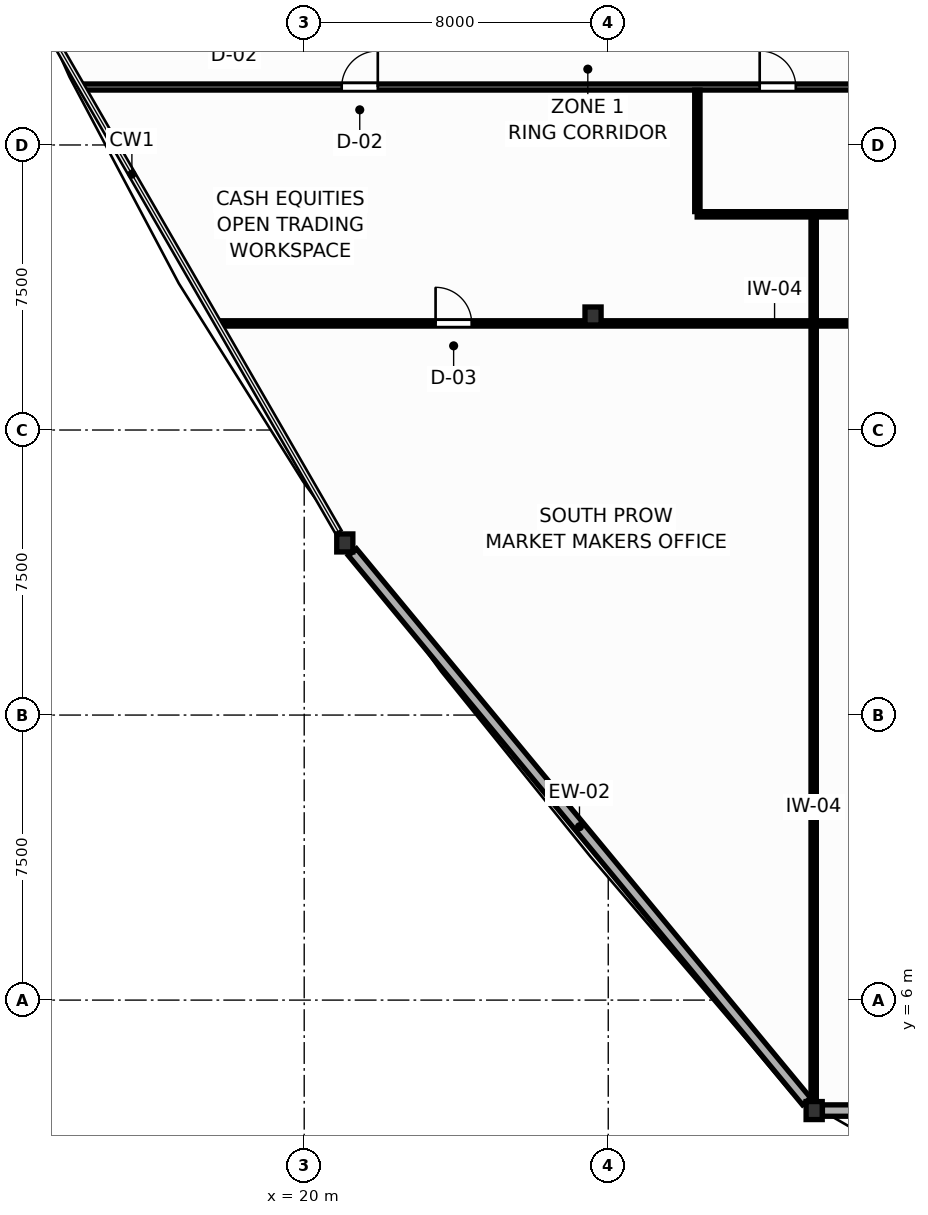
"""IFC4 building model, lengths in metres.
Left out: names, types, materials, properties, quantities, classifications, styles, units other than length and angle.
Written with IfcOpenShell. Run it as: python <this file> out.ifc"""

import sys

from ifc_helpers import new_model, si_unit, direction, frame, frame_2d, origin, origin_2d, place, context, subcontext, project, spatial, rectangle, i_section, extrude, source, transform, mapped, element, fill, save


model = new_model("IFC4")
c1 = context("Model", 3, precision=1e-05, world=origin(), true_north=direction((0.0, 1.0)))
c2 = subcontext(c1, "Body", "Model", "MODEL_VIEW")
j1 = project(units=[si_unit("LENGTHUNIT", "METRE"), si_unit("PLANEANGLEUNIT", "RADIAN")], contexts=[c1])
p1 = place(None, origin())
s1 = spatial("IfcSite", under=j1, at=p1, CompositionType="ELEMENT")
p2 = place(p1, origin())
s2 = spatial("IfcBuilding", under=s1, at=p2, CompositionType="ELEMENT")
p3 = place(p2, frame((0.0, 0.0, 31.8)))
s3 = spatial("IfcBuildingStorey", under=s2, at=p3, CompositionType="ELEMENT", Elevation=31.8)
m1 = source(origin(), c2, "Body", "SweptSolid", [
    extrude(i_section(OverallWidth=0.424, OverallDepth=0.474, WebThickness=0.045, FlangeThickness=0.072, FilletRadius=0.015, at=origin_2d()), origin(), (0.0, 0.0, 1.0), 3.9),
])
for number, where, z_axis, x_axis in (
    (1, (27.6, 24.0, 0.0), (0.0, 0.0, 1.0), (1.0, 0.0, 0.0)),
    (2, (21.068, 18.029, 0.0), (0.0, 0.0, 1.0), (1.0, 0.0, 0.0)),
    (3, (33.418, 3.094, 0.0), (0.0, 0.0, 1.0), (1.0, 0.0, 0.0)),
):
    element("IfcColumn", number, at=place(p3, frame(where, z_axis=z_axis, x_axis=x_axis)), inside=s3, PredefinedType="COLUMN", context=c2, shape_type="MappedRepresentation", body=[
        mapped(m1, transform((0.0, 0.0, 0.0), scale=1.0)),
    ])
p4 = place(p3, frame((21.268, 17.787, 0.0), z_axis=(0.0, 0.0, 1.0), x_axis=(0.637262575447, -0.770646747826, 0.0)))
e4 = element("IfcWall", 4, at=p4, inside=s3, PredefinedType="SOLIDWALL", context=c2, shape_type="SweptSolid", body=[
    extrude(rectangle(XDim=18.752, YDim=0.28, at=frame_2d((9.376, 0.0))), origin(), (0.0, 0.0, 1.0), 2.08),
])
p5 = place(p3, frame((33.635, 3.094, 0.0), z_axis=(0.0, 0.0, 1.0), x_axis=(1.0, 0.0, 0.0)))
e5 = element("IfcWall", 5, at=p5, inside=s3, PredefinedType="SOLIDWALL", context=c2, shape_type="SweptSolid", body=[
    extrude(rectangle(XDim=4.73, YDim=0.3, at=frame_2d((2.365, 0.0))), origin(), (0.0, 0.0, 1.0), 2.08),
])
p6 = place(p5, frame((1.515, 0.0, 0.75)))
e6 = element("IfcOpeningElement", 6, at=p6, cuts=e5, PredefinedType="OPENING", context=c2, shape_type="SweptSolid", body=[
    extrude(rectangle(XDim=1.7, YDim=1.15, at=frame_2d((0.85, 0.575))), frame((0.0, 0.16, 0.0), z_axis=(0.0, -1.0, 0.0), x_axis=(1.0, 0.0, 0.0)), (0.0, 0.0, 1.0), 0.32),
])
p7 = place(p3, frame((14.162, 30.025, 0.0), z_axis=(0.0, 0.0, 1.0), x_axis=(1.0, 0.0, 0.0)))
e7 = element("IfcWall", 7, at=p7, inside=s3, PredefinedType="PARTITIONING", context=c2, shape_type="SweptSolid", body=[
    extrude(rectangle(XDim=43.676, YDim=0.16, at=frame_2d((21.838, 0.0))), origin(), (0.0, 0.0, 1.0), 3.68),
])
p8 = place(p7, frame((17.823, 0.0, 0.0)))
e8 = element("IfcOpeningElement", 8, at=p8, cuts=e7, PredefinedType="OPENING", context=c2, shape_type="SweptSolid", body=[
    extrude(rectangle(XDim=0.95, YDim=2.05, at=frame_2d((0.475, 1.025))), frame((0.0, 0.09, 0.0), z_axis=(0.0, -1.0, 0.0), x_axis=(1.0, 0.0, 0.0)), (0.0, 0.0, 1.0), 0.18),
])
p9 = place(p7, frame((6.824, 0.0, 0.0)))
e9 = element("IfcOpeningElement", 9, at=p9, cuts=e7, PredefinedType="OPENING", context=c2, shape_type="SweptSolid", body=[
    extrude(rectangle(XDim=0.95, YDim=2.05, at=frame_2d((0.475, 1.025))), frame((0.0, 0.09, 0.0), z_axis=(0.0, -1.0, 0.0), x_axis=(1.0, 0.0, 0.0)), (0.0, 0.0, 1.0), 0.18),
])
p10 = place(p7, frame((27.146, 0.0, 0.0)))
e10 = element("IfcOpeningElement", 10, at=p10, cuts=e7, PredefinedType="OPENING", context=c2, shape_type="SweptSolid", body=[
    extrude(rectangle(XDim=0.95, YDim=2.05, at=frame_2d((0.475, 1.025))), frame((0.0, 0.09, 0.0), z_axis=(0.0, -1.0, 0.0), x_axis=(1.0, 0.0, 0.0)), (0.0, 0.0, 1.0), 0.18),
])
p11 = place(p3, frame((17.753, 23.805, 0.0), z_axis=(0.0, 0.0, 1.0), x_axis=(1.0, 0.0, 0.0)))
e11 = element("IfcWall", 11, at=p11, inside=s3, PredefinedType="PARTITIONING", context=c2, shape_type="SweptSolid", body=[
    extrude(rectangle(XDim=36.494, YDim=0.14, at=frame_2d((18.247, 0.0))), origin(), (0.0, 0.0, 1.0), 2.24),
])
p12 = place(p11, frame((5.704, 0.0, 0.0)))
e12 = element("IfcOpeningElement", 12, at=p12, cuts=e11, PredefinedType="OPENING", context=c2, shape_type="SweptSolid", body=[
    extrude(rectangle(XDim=0.95, YDim=2.05, at=frame_2d((0.475, 1.025))), frame((0.0, 0.08, 0.0), z_axis=(0.0, -1.0, 0.0), x_axis=(1.0, 0.0, 0.0)), (0.0, 0.0, 1.0), 0.16),
])
p13 = place(p11, frame((22.593, 0.0, 0.0)))
e13 = element("IfcOpeningElement", 13, at=p13, cuts=e11, PredefinedType="OPENING", context=c2, shape_type="SweptSolid", body=[
    extrude(rectangle(XDim=0.95, YDim=2.05, at=frame_2d((0.475, 1.025))), frame((0.0, 0.08, 0.0), z_axis=(0.0, -1.0, 0.0), x_axis=(1.0, 0.0, 0.0)), (0.0, 0.0, 1.0), 0.16),
])
p14 = place(p3, frame((33.405, 3.129, 0.0), z_axis=(0.0, 0.0, 1.0), x_axis=(0.0, 1.0, 0.0)))
e14 = element("IfcWall", 14, at=p14, inside=s3, PredefinedType="PARTITIONING", context=c2, shape_type="SweptSolid", body=[
    extrude(rectangle(XDim=23.561, YDim=0.14, at=frame_2d((11.78, 0.0))), origin(), (0.0, 0.0, 1.0), 2.24),
])
p15 = place(p3, frame((30.34, 26.675, 0.0), z_axis=(0.0, 0.0, 1.0), x_axis=(1.0, 0.0, 0.0)))
e15 = element("IfcWall", 15, at=p15, inside=s3, PredefinedType="PARTITIONING", context=c2, shape_type="SweptSolid", body=[
    extrude(rectangle(XDim=4.24, YDim=0.14, at=frame_2d((2.12, 0.0))), origin(), (0.0, 0.0, 1.0), 3.68),
])
p16 = place(p3, frame((30.345, 26.747, 0.0), z_axis=(0.0, 0.0, 1.0), x_axis=(0.0, 1.0, 0.0)))
e16 = element("IfcWall", 16, at=p16, inside=s3, PredefinedType="PARTITIONING", context=c2, shape_type="SweptSolid", body=[
    extrude(rectangle(XDim=3.196, YDim=0.14, at=frame_2d((1.598, 0.0))), origin(), (0.0, 0.0, 1.0), 3.68),
])
p17 = place(p8, origin())
e17 = element("IfcDoor", 17, at=p17, inside=s3, OperationType="SINGLE_SWING_LEFT", PredefinedType="DOOR", context=c2, shape_type="SweptSolid", body=[
    extrude(rectangle(XDim=0.95, YDim=2.05, at=frame_2d((0.475, 1.025))), frame((0.0, 0.025, 0.0), z_axis=(0.0, -1.0, 0.0), x_axis=(1.0, 0.0, 0.0)), (0.0, 0.0, 1.0), 0.05),
])
fill(e8, e17)
p18 = place(p9, origin())
e18 = element("IfcDoor", 18, at=p18, inside=s3, OperationType="SINGLE_SWING_RIGHT", PredefinedType="DOOR", context=c2, shape_type="SweptSolid", body=[
    extrude(rectangle(XDim=0.95, YDim=2.05, at=frame_2d((0.475, 1.025))), frame((0.0, 0.025, 0.0), z_axis=(0.0, -1.0, 0.0), x_axis=(1.0, 0.0, 0.0)), (0.0, 0.0, 1.0), 0.05),
])
fill(e9, e18)
p19 = place(p12, origin())
e19 = element("IfcDoor", 19, at=p19, inside=s3, OperationType="SINGLE_SWING_LEFT", PredefinedType="DOOR", context=c2, shape_type="SweptSolid", body=[
    extrude(rectangle(XDim=0.95, YDim=2.05, at=frame_2d((0.475, 1.025))), frame((0.0, 0.025, 0.0), z_axis=(0.0, -1.0, 0.0), x_axis=(1.0, 0.0, 0.0)), (0.0, 0.0, 1.0), 0.05),
])
fill(e12, e19)
save(model, sys.argv[1])
